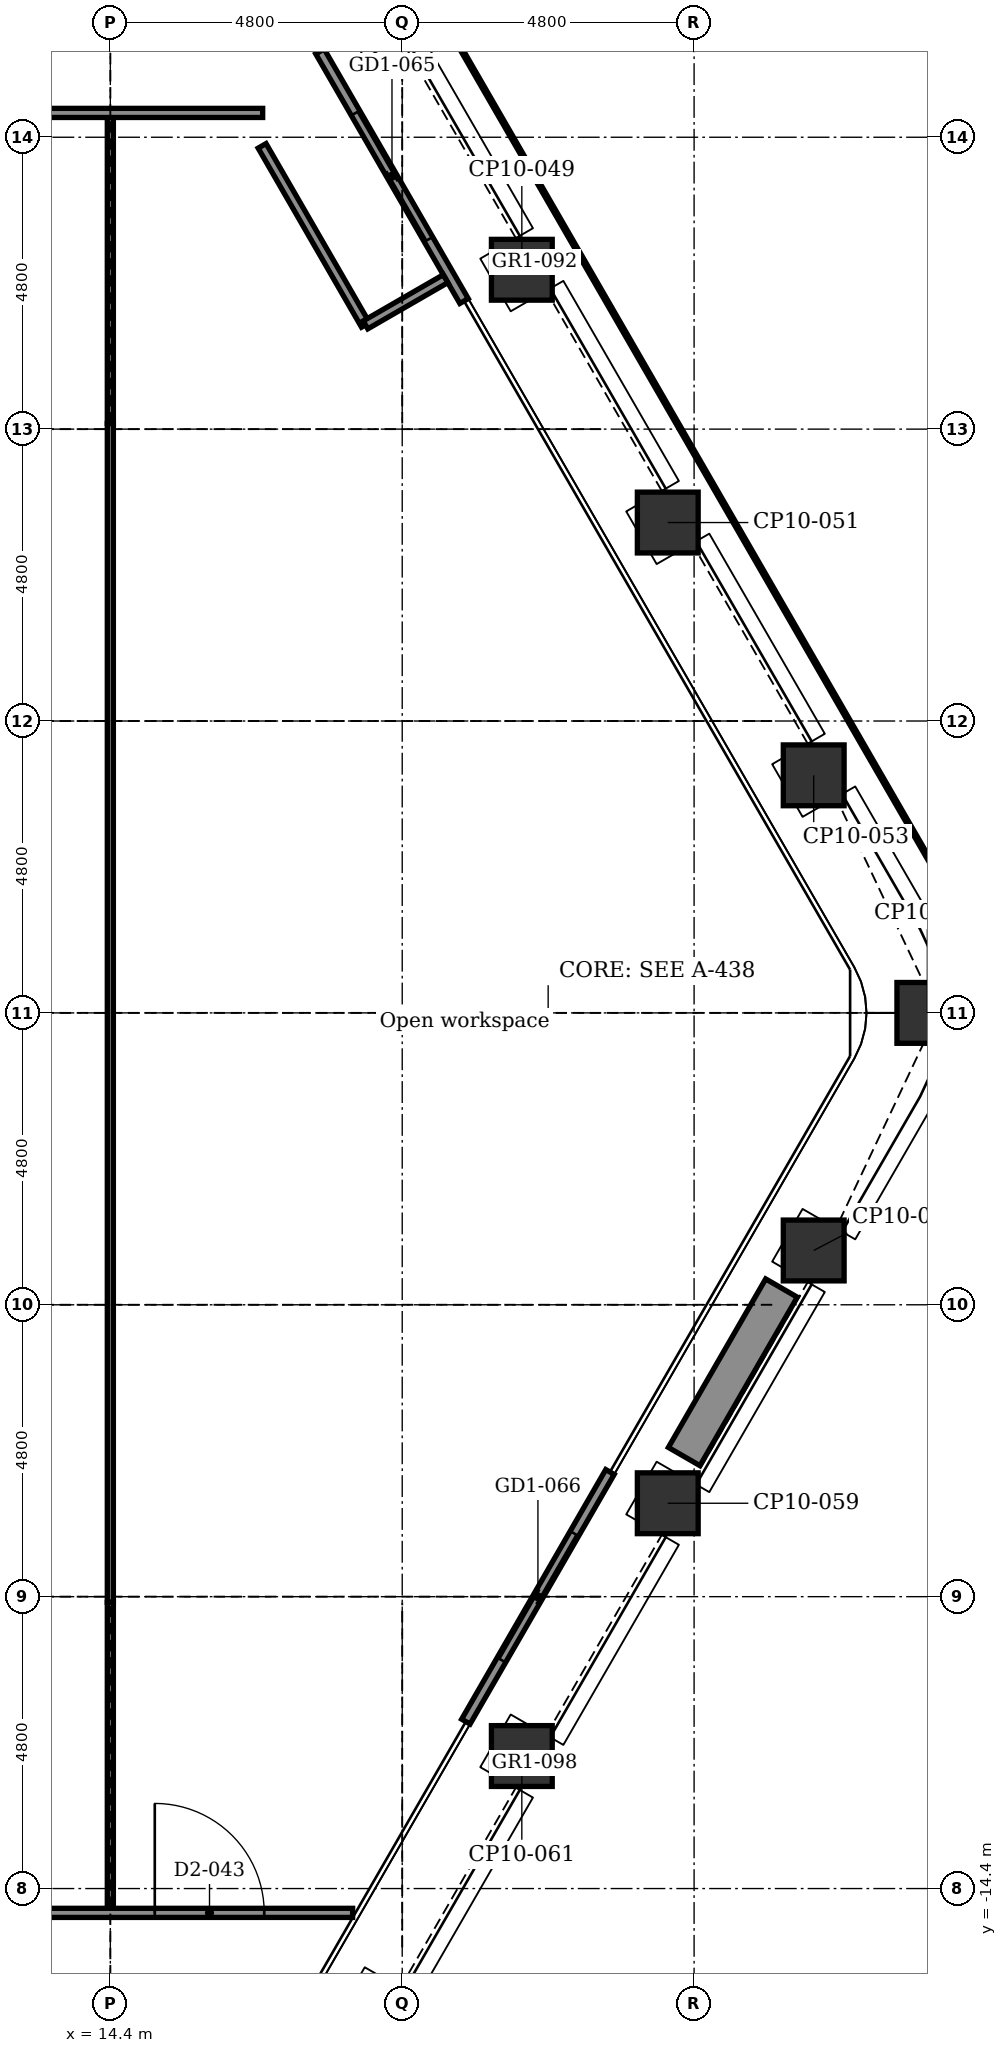
"""IFC4 building model, lengths in metres.
Left out: names, types, materials, properties, quantities, classifications, styles, units other than length and angle.
Written with IfcOpenShell. Run it as: python <this file> out.ifc"""

import sys

from ifc_helpers import new_model, si_unit, direction, frame, frame_2d, origin, origin_2d, place, context, subcontext, project, spatial, rectangle, extrude, element, fill, save


model = new_model("IFC4")
c1 = context("Model", 3, precision=1e-05, world=origin(), true_north=direction((0.0, 1.0)))
c2 = subcontext(c1, "Body", "Model", "MODEL_VIEW")
j1 = project(units=[si_unit("LENGTHUNIT", "METRE"), si_unit("PLANEANGLEUNIT", "RADIAN")], contexts=[c1])
p1 = place(None, origin())
s1 = spatial("IfcSite", under=j1, at=p1, CompositionType="ELEMENT")
p2 = place(p1, origin())
s2 = spatial("IfcBuilding", under=s1, at=p2, CompositionType="ELEMENT")
p3 = place(p2, frame((0.0, 0.0, 150.5)))
s3 = spatial("IfcBuildingStorey", under=s2, at=p3, CompositionType="ELEMENT", Elevation=150.5)
for number, where, z_axis, x_axis in (
    (1, (18.767, 16.378, -0.15), (0.0, 0.0, 1.0), (0.866, 0.5, 0.0)),
    (2, (21.167, 12.221, -0.15), (0.0, 0.0, 1.0), (0.866, 0.5, 0.0)),
    (3, (23.567, 8.064, -0.15), (0.0, 0.0, 1.0), (0.866, 0.5, 0.0)),
    (4, (25.967, 3.907, -0.15), (0.0, 0.0, 1.0), (0.866, 0.5, 0.0)),
    (5, (27.836, 0.0, -0.15), (0.0, 0.0, 1.0), (1.0, 0.0, 0.0)),
    (6, (25.967, -3.907, -0.15), (0.0, 0.0, 1.0), (0.5, 0.866, 0.0)),
    (7, (23.567, -8.064, -0.15), (0.0, 0.0, 1.0), (0.5, 0.866, 0.0)),
    (8, (21.167, -12.221, -0.15), (0.0, 0.0, 1.0), (0.5, 0.866, 0.0)),
    (9, (18.767, -16.378, -0.15), (0.0, 0.0, 1.0), (0.5, 0.866, 0.0)),
):
    element("IfcColumn", number, at=place(p3, frame(where, z_axis=z_axis, x_axis=x_axis)), inside=s3, PredefinedType="COLUMN", context=c2, shape_type="SweptSolid", body=[
        extrude(rectangle(XDim=1.0, YDim=1.0, at=origin_2d()), origin(), (0.0, 0.0, 1.0), 3.9),
    ])
p4 = place(p3, frame((17.847, 15.812, 0.0), z_axis=(0.0, 0.0, 1.0), x_axis=(0.5000167099, -0.866015756104, 0.0)))
e10 = element("IfcWall", 10, at=p4, inside=s3, PredefinedType="PARTITIONING", context=c2, shape_type="SweptSolid", body=[
    extrude(rectangle(XDim=4.74, YDim=0.16, at=frame_2d((2.37, 0.0))), origin(), (0.0, 0.0, 1.0), 3.75),
])
p5 = place(p4, frame((1.17, 0.0, 0.0)))
e11 = element("IfcOpeningElement", 11, at=p5, cuts=e10, PredefinedType="OPENING", context=c2, shape_type="SweptSolid", body=[
    extrude(rectangle(XDim=2.4, YDim=2.4, at=frame_2d((1.2, 1.2))), frame((0.0, 0.09, 0.0), z_axis=(0.0, -1.0, 0.0), x_axis=(1.0, 0.0, 0.0)), (0.0, 0.0, 1.0), 0.18),
])
p6 = place(p3, frame((22.617, -7.55, 0.0), z_axis=(0.0, 0.0, 1.0), x_axis=(-0.5000167099, -0.866015756104, 0.0)))
e12 = element("IfcWall", 12, at=p6, inside=s3, PredefinedType="PARTITIONING", context=c2, shape_type="SweptSolid", body=[
    extrude(rectangle(XDim=4.74, YDim=0.16, at=frame_2d((2.37, 0.0))), origin(), (0.0, 0.0, 1.0), 3.75),
])
p7 = place(p6, frame((1.17, 0.0, 0.0)))
e13 = element("IfcOpeningElement", 13, at=p7, cuts=e12, PredefinedType="OPENING", context=c2, shape_type="SweptSolid", body=[
    extrude(rectangle(XDim=2.4, YDim=2.4, at=frame_2d((1.2, 1.2))), frame((0.0, 0.09, 0.0), z_axis=(0.0, -1.0, 0.0), x_axis=(1.0, 0.0, 0.0)), (0.0, 0.0, 1.0), 0.18),
])
p8 = place(p3, frame((25.437, -4.525, 0.0), z_axis=(0.0, 0.0, 1.0), x_axis=(-0.499938187974, -0.866061088033, 0.0)))
e14 = element("IfcWall", 14, at=p8, inside=s3, PredefinedType="USERDEFINED", context=c2, shape_type="SweptSolid", body=[
    extrude(rectangle(XDim=3.2, YDim=0.6, at=frame_2d((1.6, 0.0))), origin(), (0.0, 0.0, 1.0), 0.7),
])
p9 = place(p3, frame((14.4, -9.694, 0.0), z_axis=(0.0, 0.0, 1.0), x_axis=(0.0, 1.0, 0.0)))
e15 = element("IfcWall", 15, at=p9, inside=s3, PredefinedType="PARTITIONING", context=c2, shape_type="SweptSolid", body=[
    extrude(rectangle(XDim=19.387, YDim=0.1, at=frame_2d((9.694, 0.0))), origin(), (0.0, 0.0, 1.0), 3.75),
])
for number, where, z_axis, x_axis in (
    (16, (14.4, -14.8, 0.0), (0.0, 0.0, 1.0), (0.0, 1.0, 0.0)),
    (17, (14.4, 9.694, 0.0), (0.0, 0.0, 1.0), (0.0, 1.0, 0.0)),
):
    element("IfcWall", number, at=place(p3, frame(where, z_axis=z_axis, x_axis=x_axis)), inside=s3, PredefinedType="PARTITIONING", context=c2, shape_type="SweptSolid", body=[
        extrude(rectangle(XDim=5.106, YDim=0.1, at=frame_2d((2.553, 0.0))), origin(), (0.0, 0.0, 1.0), 3.066),
    ])
p10 = place(p3, frame((16.896, 14.258, 0.0), z_axis=(0.0, 0.0, 1.0), x_axis=(0.499977295307, -0.866038511948, 0.0)))
e18 = element("IfcWall", 18, at=p10, inside=s3, PredefinedType="PARTITIONING", context=c2, shape_type="SweptSolid", body=[
    extrude(rectangle(XDim=3.4, YDim=0.15, at=frame_2d((1.7, 0.0))), origin(), (0.0, 0.0, 1.0), 3.75),
])
p11 = place(p3, frame((18.596, 11.314, 0.0), z_axis=(0.0, 0.0, 1.0), x_axis=(0.866030456496, 0.499991248344, 0.0)))
e19 = element("IfcWall", 19, at=p11, inside=s3, PredefinedType="PARTITIONING", context=c2, shape_type="SweptSolid", body=[
    extrude(rectangle(XDim=1.52, YDim=0.15, at=frame_2d((0.76, 0.0))), origin(), (0.0, 0.0, 1.0), 3.75),
])
p12 = place(p3, frame((5.4, -14.8, 0.0), z_axis=(0.0, 0.0, 1.0), x_axis=(1.0, 0.0, 0.0)))
e20 = element("IfcWall", 20, at=p12, inside=s3, PredefinedType="PARTITIONING", context=c2, shape_type="SweptSolid", body=[
    extrude(rectangle(XDim=12.985, YDim=0.15, at=frame_2d((6.492, 0.0))), origin(), (0.0, 0.0, 1.0), 3.75),
])
p13 = place(p12, frame((9.731, 0.0, 0.0)))
e21 = element("IfcOpeningElement", 21, at=p13, cuts=e20, PredefinedType="OPENING", context=c2, shape_type="SweptSolid", body=[
    extrude(rectangle(XDim=1.8, YDim=2.1, at=frame_2d((0.9, 1.05))), frame((0.0, 0.085, 0.0), z_axis=(0.0, -1.0, 0.0), x_axis=(1.0, 0.0, 0.0)), (0.0, 0.0, 1.0), 0.17),
])
p14 = place(p3, frame((6.0, 14.8, 0.0), z_axis=(0.0, 0.0, 1.0), x_axis=(1.0, 0.0, 0.0)))
e22 = element("IfcWall", 22, at=p14, inside=s3, PredefinedType="PARTITIONING", context=c2, shape_type="SweptSolid", body=[
    extrude(rectangle(XDim=10.905, YDim=0.15, at=frame_2d((5.453, 0.0))), origin(), (0.0, 0.0, 1.0), 3.75),
])
p15 = place(p14, frame((4.485, 0.0, 0.0)))
e23 = element("IfcOpeningElement", 23, at=p15, cuts=e22, PredefinedType="OPENING", context=c2, shape_type="SweptSolid", body=[
    extrude(rectangle(XDim=1.0, YDim=2.1, at=frame_2d((0.5, 1.05))), frame((0.0, 0.085, 0.0), z_axis=(0.0, -1.0, 0.0), x_axis=(1.0, 0.0, 0.0)), (0.0, 0.0, 1.0), 0.17),
])
p16 = place(p5, origin())
e24 = element("IfcDoor", 24, at=p16, inside=s3, OperationType="DOUBLE_DOOR_SLIDING", PredefinedType="DOOR", context=c2, shape_type="SweptSolid", body=[
    extrude(rectangle(XDim=2.4, YDim=2.4, at=frame_2d((1.2, 1.2))), frame((0.0, 0.025, 0.0), z_axis=(0.0, -1.0, 0.0), x_axis=(1.0, 0.0, 0.0)), (0.0, 0.0, 1.0), 0.05),
])
fill(e11, e24)
p17 = place(p7, origin())
e25 = element("IfcDoor", 25, at=p17, inside=s3, OperationType="DOUBLE_DOOR_SLIDING", PredefinedType="DOOR", context=c2, shape_type="SweptSolid", body=[
    extrude(rectangle(XDim=2.4, YDim=2.4, at=frame_2d((1.2, 1.2))), frame((0.0, 0.025, 0.0), z_axis=(0.0, -1.0, 0.0), x_axis=(1.0, 0.0, 0.0)), (0.0, 0.0, 1.0), 0.05),
])
fill(e13, e25)
p18 = place(p13, origin())
e26 = element("IfcDoor", 26, at=p18, inside=s3, OperationType="SINGLE_SWING_LEFT", PredefinedType="DOOR", context=c2, shape_type="SweptSolid", body=[
    extrude(rectangle(XDim=1.8, YDim=2.1, at=frame_2d((0.9, 1.05))), frame((0.0, 0.025, 0.0), z_axis=(0.0, -1.0, 0.0), x_axis=(1.0, 0.0, 0.0)), (0.0, 0.0, 1.0), 0.05),
])
fill(e21, e26)
save(model, sys.argv[1])
